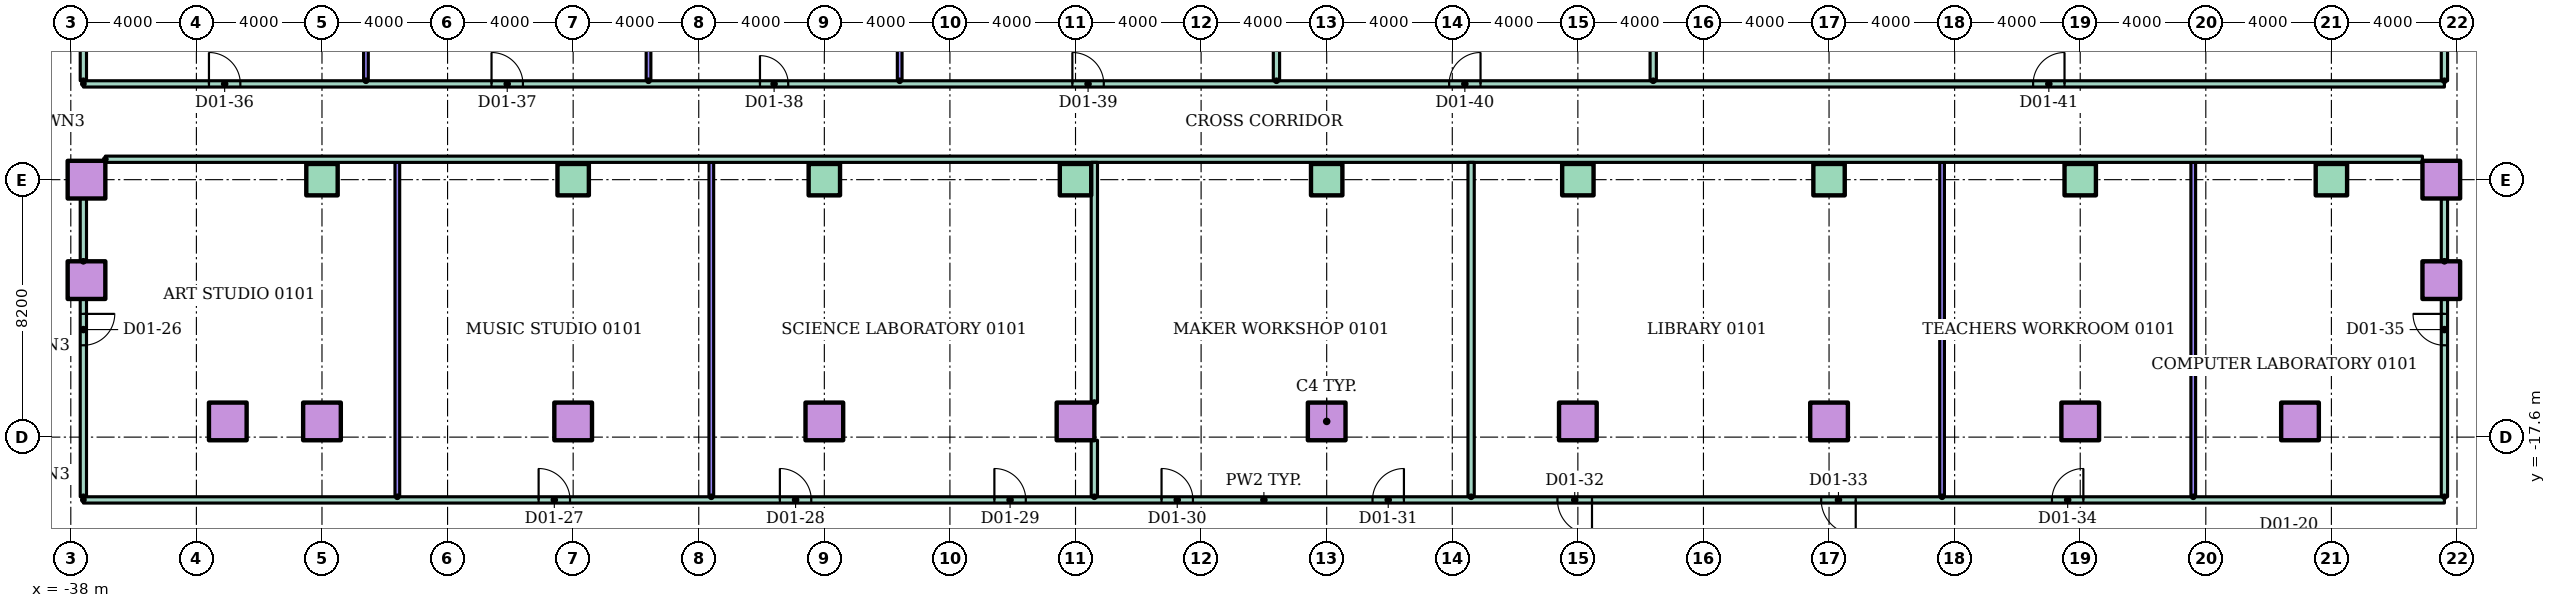
"""IFC4 building model, lengths in metres.
Left out: names, types, materials, properties, quantities, classifications, styles, units other than length and angle.
Written with IfcOpenShell. Run it as: python <this file> out.ifc"""

import sys

from ifc_helpers import new_model, si_unit, direction, frame, frame_2d, origin, origin_2d, place, context, subcontext, project, spatial, rectangle, hollow_rectangle, extrude, element, fill, save


model = new_model("IFC4")
c1 = context("Model", 3, precision=1e-05, world=origin(), true_north=direction((0.0, 1.0)))
c2 = subcontext(c1, "Body", "Model", "MODEL_VIEW")
j1 = project(units=[si_unit("LENGTHUNIT", "METRE"), si_unit("PLANEANGLEUNIT", "RADIAN")], contexts=[c1])
p1 = place(None, origin())
s1 = spatial("IfcSite", under=j1, at=p1, CompositionType="ELEMENT")
p2 = place(p1, origin())
s2 = spatial("IfcBuilding", under=s1, at=p2, CompositionType="ELEMENT")
p3 = place(p2, frame((0.0, 0.0, 6.0)))
s3 = spatial("IfcBuildingStorey", under=s2, at=p3, CompositionType="ELEMENT", Elevation=6.0)
for number, where in (
    (1, (-33.0, -17.1, 0.0)),
    (2, (-30.0, -17.1, 0.0)),
    (3, (-22.0, -17.1, 0.0)),
    (4, (-14.0, -17.1, 0.0)),
    (5, (-6.0, -17.1, 0.0)),
    (6, (2.0, -17.1, 0.0)),
    (7, (10.0, -17.1, 0.0)),
    (8, (18.0, -17.1, 0.0)),
    (9, (26.0, -17.1, 0.0)),
    (10, (33.0, -17.1, 0.0)),
    (11, (-37.5, -12.6, 0.0)),
    (12, (37.5, -12.6, 0.0)),
    (13, (-37.5, -9.4, 0.0)),
):
    element("IfcColumn", number, at=place(p3, frame(where)), inside=s3, PredefinedType="COLUMN", context=c2, shape_type="SweptSolid", body=[
        extrude(hollow_rectangle(XDim=1.2, YDim=1.2, WallThickness=0.06, at=origin_2d()), origin(), (0.0, 0.0, 1.0), 4.0),
    ])
for number, where in (
    (14, (-30.0, -9.4, 0.0)),
    (15, (-22.0, -9.4, 0.0)),
    (16, (-14.0, -9.4, 0.0)),
    (17, (-6.0, -9.4, 0.0)),
    (18, (2.0, -9.4, 0.0)),
    (19, (10.0, -9.4, 0.0)),
    (20, (18.0, -9.4, 0.0)),
    (21, (26.0, -9.4, 0.0)),
    (22, (34.0, -9.4, 0.0)),
):
    element("IfcColumn", number, at=place(p3, frame(where)), inside=s3, PredefinedType="COLUMN", context=c2, shape_type="SweptSolid", body=[
        extrude(rectangle(XDim=1.0, YDim=1.0, at=origin_2d()), origin(), (0.0, 0.0, 1.0), 4.0),
    ])
p4 = place(p3, frame((37.5, -9.4, 0.0)))
e23 = element("IfcColumn", 23, at=p4, inside=s3, PredefinedType="COLUMN", context=c2, shape_type="SweptSolid", body=[
    extrude(hollow_rectangle(XDim=1.2, YDim=1.2, WallThickness=0.06, at=origin_2d()), origin(), (0.0, 0.0, 1.0), 4.0),
])
p5 = place(p3, frame((-37.6, -19.6, 0.0)))
e24 = element("IfcWall", 24, at=p5, inside=s3, PredefinedType="PARTITIONING", context=c2, shape_type="SweptSolid", body=[
    extrude(rectangle(XDim=75.2, YDim=0.2, at=frame_2d((37.6, 0.0))), origin(), (0.0, 0.0, 1.0), 3.7),
])
p6 = place(p5, frame((14.5, 0.0, 0.0)))
e25 = element("IfcOpeningElement", 25, at=p6, cuts=e24, PredefinedType="OPENING", context=c2, shape_type="SweptSolid", body=[
    extrude(rectangle(XDim=1.0, YDim=2.1, at=frame_2d((0.5, 1.05))), frame((0.0, 0.11, 0.0), z_axis=(0.0, -1.0, 0.0), x_axis=(1.0, 0.0, 0.0)), (0.0, 0.0, 1.0), 0.22),
])
p7 = place(p5, frame((22.184, 0.0, 0.0)))
e26 = element("IfcOpeningElement", 26, at=p7, cuts=e24, PredefinedType="OPENING", context=c2, shape_type="SweptSolid", body=[
    extrude(rectangle(XDim=1.0, YDim=2.1, at=frame_2d((0.5, 1.05))), frame((0.0, 0.11, 0.0), z_axis=(0.0, -1.0, 0.0), x_axis=(1.0, 0.0, 0.0)), (0.0, 0.0, 1.0), 0.22),
])
p8 = place(p5, frame((29.016, 0.0, 0.0)))
e27 = element("IfcOpeningElement", 27, at=p8, cuts=e24, PredefinedType="OPENING", context=c2, shape_type="SweptSolid", body=[
    extrude(rectangle(XDim=1.0, YDim=2.1, at=frame_2d((0.5, 1.05))), frame((0.0, 0.11, 0.0), z_axis=(0.0, -1.0, 0.0), x_axis=(1.0, 0.0, 0.0)), (0.0, 0.0, 1.0), 0.22),
])
p9 = place(p5, frame((34.34, 0.0, 0.0)))
e28 = element("IfcOpeningElement", 28, at=p9, cuts=e24, PredefinedType="OPENING", context=c2, shape_type="SweptSolid", body=[
    extrude(rectangle(XDim=1.0, YDim=2.1, at=frame_2d((0.5, 1.05))), frame((0.0, 0.11, 0.0), z_axis=(0.0, -1.0, 0.0), x_axis=(1.0, 0.0, 0.0)), (0.0, 0.0, 1.0), 0.22),
])
p10 = place(p5, frame((41.06, 0.0, 0.0)))
e29 = element("IfcOpeningElement", 29, at=p10, cuts=e24, PredefinedType="OPENING", context=c2, shape_type="SweptSolid", body=[
    extrude(rectangle(XDim=1.0, YDim=2.1, at=frame_2d((0.5, 1.05))), frame((0.0, 0.11, 0.0), z_axis=(0.0, -1.0, 0.0), x_axis=(1.0, 0.0, 0.0)), (0.0, 0.0, 1.0), 0.22),
])
p11 = place(p5, frame((46.95, 0.0, 0.0)))
e30 = element("IfcOpeningElement", 30, at=p11, cuts=e24, PredefinedType="OPENING", context=c2, shape_type="SweptSolid", body=[
    extrude(rectangle(XDim=1.1, YDim=2.1, at=frame_2d((0.55, 1.05))), frame((0.0, 0.11, 0.0), z_axis=(0.0, -1.0, 0.0), x_axis=(1.0, 0.0, 0.0)), (0.0, 0.0, 1.0), 0.22),
])
p12 = place(p5, frame((55.35, 0.0, 0.0)))
e31 = element("IfcOpeningElement", 31, at=p12, cuts=e24, PredefinedType="OPENING", context=c2, shape_type="SweptSolid", body=[
    extrude(rectangle(XDim=1.1, YDim=2.1, at=frame_2d((0.55, 1.05))), frame((0.0, 0.11, 0.0), z_axis=(0.0, -1.0, 0.0), x_axis=(1.0, 0.0, 0.0)), (0.0, 0.0, 1.0), 0.22),
])
p13 = place(p5, frame((62.7, 0.0, 0.0)))
e32 = element("IfcOpeningElement", 32, at=p13, cuts=e24, PredefinedType="OPENING", context=c2, shape_type="SweptSolid", body=[
    extrude(rectangle(XDim=1.0, YDim=2.1, at=frame_2d((0.5, 1.05))), frame((0.0, 0.11, 0.0), z_axis=(0.0, -1.0, 0.0), x_axis=(1.0, 0.0, 0.0)), (0.0, 0.0, 1.0), 0.22),
])
p14 = place(p3, frame((-36.9, -8.75, 0.0)))
e33 = element("IfcWall", 33, at=p14, inside=s3, PredefinedType="PARTITIONING", context=c2, shape_type="SweptSolid", body=[
    extrude(rectangle(XDim=73.8, YDim=0.2, at=frame_2d((36.9, 0.0))), origin(), (0.0, 0.0, 1.0), 3.7),
])
p15 = place(p3, frame((-37.6, -6.35, 0.0)))
e34 = element("IfcWall", 34, at=p15, inside=s3, PredefinedType="PARTITIONING", context=c2, shape_type="SweptSolid", body=[
    extrude(rectangle(XDim=75.2, YDim=0.2, at=frame_2d((37.6, 0.0))), origin(), (0.0, 0.0, 1.0), 3.7),
])
p16 = place(p15, frame((4.0, 0.0, 0.0)))
e35 = element("IfcOpeningElement", 35, at=p16, cuts=e34, PredefinedType="OPENING", context=c2, shape_type="SweptSolid", body=[
    extrude(rectangle(XDim=1.0, YDim=2.1, at=frame_2d((0.5, 1.05))), frame((0.0, 0.11, 0.0), z_axis=(0.0, -1.0, 0.0), x_axis=(1.0, 0.0, 0.0)), (0.0, 0.0, 1.0), 0.22),
])
p17 = place(p15, frame((13.0, 0.0, 0.0)))
e36 = element("IfcOpeningElement", 36, at=p17, cuts=e34, PredefinedType="OPENING", context=c2, shape_type="SweptSolid", body=[
    extrude(rectangle(XDim=1.0, YDim=2.1, at=frame_2d((0.5, 1.05))), frame((0.0, 0.11, 0.0), z_axis=(0.0, -1.0, 0.0), x_axis=(1.0, 0.0, 0.0)), (0.0, 0.0, 1.0), 0.22),
])
p18 = place(p15, frame((21.55, 0.0, 0.0)))
e37 = element("IfcOpeningElement", 37, at=p18, cuts=e34, PredefinedType="OPENING", context=c2, shape_type="SweptSolid", body=[
    extrude(rectangle(XDim=0.9, YDim=2.1, at=frame_2d((0.45, 1.05))), frame((0.0, 0.11, 0.0), z_axis=(0.0, -1.0, 0.0), x_axis=(1.0, 0.0, 0.0)), (0.0, 0.0, 1.0), 0.22),
])
p19 = place(p15, frame((31.5, 0.0, 0.0)))
e38 = element("IfcOpeningElement", 38, at=p19, cuts=e34, PredefinedType="OPENING", context=c2, shape_type="SweptSolid", body=[
    extrude(rectangle(XDim=1.0, YDim=2.1, at=frame_2d((0.5, 1.05))), frame((0.0, 0.11, 0.0), z_axis=(0.0, -1.0, 0.0), x_axis=(1.0, 0.0, 0.0)), (0.0, 0.0, 1.0), 0.22),
])
p20 = place(p15, frame((43.5, 0.0, 0.0)))
e39 = element("IfcOpeningElement", 39, at=p20, cuts=e34, PredefinedType="OPENING", context=c2, shape_type="SweptSolid", body=[
    extrude(rectangle(XDim=1.0, YDim=2.1, at=frame_2d((0.5, 1.05))), frame((0.0, 0.11, 0.0), z_axis=(0.0, -1.0, 0.0), x_axis=(1.0, 0.0, 0.0)), (0.0, 0.0, 1.0), 0.22),
])
p21 = place(p15, frame((62.1, 0.0, 0.0)))
e40 = element("IfcOpeningElement", 40, at=p21, cuts=e34, PredefinedType="OPENING", context=c2, shape_type="SweptSolid", body=[
    extrude(rectangle(XDim=1.0, YDim=2.1, at=frame_2d((0.5, 1.05))), frame((0.0, 0.11, 0.0), z_axis=(0.0, -1.0, 0.0), x_axis=(1.0, 0.0, 0.0)), (0.0, 0.0, 1.0), 0.22),
])
p22 = place(p3, frame((-37.6, -19.5, 0.0), z_axis=(0.0, 0.0, 1.0), x_axis=(0.0, 1.0, 0.0)))
e41 = element("IfcWall", 41, at=p22, inside=s3, PredefinedType="PARTITIONING", context=c2, shape_type="SweptSolid", body=[
    extrude(rectangle(XDim=6.3, YDim=0.2, at=frame_2d((3.15, 0.0))), origin(), (0.0, 0.0, 1.0), 3.7),
])
p23 = place(p22, frame((4.825, 0.0, 0.0)))
e42 = element("IfcOpeningElement", 42, at=p23, cuts=e41, PredefinedType="OPENING", context=c2, shape_type="SweptSolid", body=[
    extrude(rectangle(XDim=1.0, YDim=2.1, at=frame_2d((0.5, 1.05))), frame((0.0, 0.11, 0.0), z_axis=(0.0, -1.0, 0.0), x_axis=(1.0, 0.0, 0.0)), (0.0, 0.0, 1.0), 0.22),
])
p24 = place(p3, frame((-37.6, -12.0, 0.0), z_axis=(0.0, 0.0, 1.0), x_axis=(0.0, 1.0, 0.0)))
e43 = element("IfcWall", 43, at=p24, inside=s3, PredefinedType="PARTITIONING", context=c2, shape_type="SweptSolid", body=[
    extrude(rectangle(XDim=2.0, YDim=0.2, at=frame_2d((1.0, 0.0))), origin(), (0.0, 0.0, 1.0), 3.7),
])
p25 = place(p3, frame((-37.6, -6.25, 0.0), z_axis=(0.0, 0.0, 1.0), x_axis=(0.0, 1.0, 0.0)))
e44 = element("IfcWall", 44, at=p25, inside=s3, PredefinedType="PARTITIONING", context=c2, shape_type="SweptSolid", body=[
    extrude(rectangle(XDim=3.65, YDim=0.2, at=frame_2d((1.825, 0.0))), origin(), (0.0, 0.0, 1.0), 3.7),
])
p26 = place(p3, frame((-28.6, -6.25, 0.0), z_axis=(0.0, 0.0, 1.0), x_axis=(0.0, 1.0, 0.0)))
e45 = element("IfcWall", 45, at=p26, inside=s3, PredefinedType="PARTITIONING", context=c2, shape_type="SweptSolid", body=[
    extrude(rectangle(XDim=4.75, YDim=0.15, at=frame_2d((2.375, 0.0))), origin(), (0.0, 0.0, 1.0), 3.7),
])
p27 = place(p3, frame((-27.6, -19.5, 0.0), z_axis=(0.0, 0.0, 1.0), x_axis=(0.0, 1.0, 0.0)))
e46 = element("IfcWall", 46, at=p27, inside=s3, PredefinedType="PARTITIONING", context=c2, shape_type="SweptSolid", body=[
    extrude(rectangle(XDim=10.65, YDim=0.15, at=frame_2d((5.325, 0.0))), origin(), (0.0, 0.0, 1.0), 3.7),
])
p28 = place(p3, frame((-19.6, -6.25, 0.0), z_axis=(0.0, 0.0, 1.0), x_axis=(0.0, 1.0, 0.0)))
e47 = element("IfcWall", 47, at=p28, inside=s3, PredefinedType="PARTITIONING", context=c2, shape_type="SweptSolid", body=[
    extrude(rectangle(XDim=4.75, YDim=0.15, at=frame_2d((2.375, 0.0))), origin(), (0.0, 0.0, 1.0), 3.7),
])
p29 = place(p3, frame((-17.6, -19.5, 0.0), z_axis=(0.0, 0.0, 1.0), x_axis=(0.0, 1.0, 0.0)))
e48 = element("IfcWall", 48, at=p29, inside=s3, PredefinedType="PARTITIONING", context=c2, shape_type="SweptSolid", body=[
    extrude(rectangle(XDim=10.65, YDim=0.15, at=frame_2d((5.325, 0.0))), origin(), (0.0, 0.0, 1.0), 3.7),
])
p30 = place(p3, frame((-11.6, -6.25, 0.0), z_axis=(0.0, 0.0, 1.0), x_axis=(0.0, 1.0, 0.0)))
e49 = element("IfcWall", 49, at=p30, inside=s3, PredefinedType="PARTITIONING", context=c2, shape_type="SweptSolid", body=[
    extrude(rectangle(XDim=4.85, YDim=0.15, at=frame_2d((2.425, 0.0))), origin(), (0.0, 0.0, 1.0), 3.7),
])
p31 = place(p3, frame((-5.4, -19.5, 0.0), z_axis=(0.0, 0.0, 1.0), x_axis=(0.0, 1.0, 0.0)))
e50 = element("IfcWall", 50, at=p31, inside=s3, PredefinedType="PARTITIONING", context=c2, shape_type="SweptSolid", body=[
    extrude(rectangle(XDim=1.8, YDim=0.2, at=frame_2d((0.9, 0.0))), origin(), (0.0, 0.0, 1.0), 3.7),
])
p32 = place(p3, frame((-5.4, -16.5, 0.0), z_axis=(0.0, 0.0, 1.0), x_axis=(0.0, 1.0, 0.0)))
e51 = element("IfcWall", 51, at=p32, inside=s3, PredefinedType="PARTITIONING", context=c2, shape_type="SweptSolid", body=[
    extrude(rectangle(XDim=7.65, YDim=0.2, at=frame_2d((3.825, 0.0))), origin(), (0.0, 0.0, 1.0), 3.7),
])
p33 = place(p3, frame((0.4, -6.25, 0.0), z_axis=(0.0, 0.0, 1.0), x_axis=(0.0, 1.0, 0.0)))
e52 = element("IfcWall", 52, at=p33, inside=s3, PredefinedType="PARTITIONING", context=c2, shape_type="SweptSolid", body=[
    extrude(rectangle(XDim=4.85, YDim=0.2, at=frame_2d((2.425, 0.0))), origin(), (0.0, 0.0, 1.0), 3.7),
])
p34 = place(p3, frame((6.6, -19.5, 0.0), z_axis=(0.0, 0.0, 1.0), x_axis=(0.0, 1.0, 0.0)))
e53 = element("IfcWall", 53, at=p34, inside=s3, PredefinedType="PARTITIONING", context=c2, shape_type="SweptSolid", body=[
    extrude(rectangle(XDim=10.65, YDim=0.2, at=frame_2d((5.325, 0.0))), origin(), (0.0, 0.0, 1.0), 3.7),
])
p35 = place(p3, frame((12.4, -6.25, 0.0), z_axis=(0.0, 0.0, 1.0), x_axis=(0.0, 1.0, 0.0)))
e54 = element("IfcWall", 54, at=p35, inside=s3, PredefinedType="PARTITIONING", context=c2, shape_type="SweptSolid", body=[
    extrude(rectangle(XDim=4.85, YDim=0.2, at=frame_2d((2.425, 0.0))), origin(), (0.0, 0.0, 1.0), 3.7),
])
for number, where, z_axis, x_axis in (
    (55, (21.6, -19.5, 0.0), (0.0, 0.0, 1.0), (0.0, 1.0, 0.0)),
    (56, (29.6, -19.5, 0.0), (0.0, 0.0, 1.0), (0.0, 1.0, 0.0)),
):
    element("IfcWall", number, at=place(p3, frame(where, z_axis=z_axis, x_axis=x_axis)), inside=s3, PredefinedType="PARTITIONING", context=c2, shape_type="SweptSolid", body=[
        extrude(rectangle(XDim=10.65, YDim=0.15, at=frame_2d((5.325, 0.0))), origin(), (0.0, 0.0, 1.0), 3.7),
    ])
p36 = place(p3, frame((37.6, -19.5, 0.0), z_axis=(0.0, 0.0, 1.0), x_axis=(0.0, 1.0, 0.0)))
e57 = element("IfcWall", 57, at=p36, inside=s3, PredefinedType="PARTITIONING", context=c2, shape_type="SweptSolid", body=[
    extrude(rectangle(XDim=6.3, YDim=0.2, at=frame_2d((3.15, 0.0))), origin(), (0.0, 0.0, 1.0), 3.7),
])
p37 = place(p36, frame((4.825, 0.0, 0.0)))
e58 = element("IfcOpeningElement", 58, at=p37, cuts=e57, PredefinedType="OPENING", context=c2, shape_type="SweptSolid", body=[
    extrude(rectangle(XDim=1.0, YDim=2.1, at=frame_2d((0.5, 1.05))), frame((0.0, 0.11, 0.0), z_axis=(0.0, -1.0, 0.0), x_axis=(1.0, 0.0, 0.0)), (0.0, 0.0, 1.0), 0.22),
])
p38 = place(p3, frame((37.6, -12.0, 0.0), z_axis=(0.0, 0.0, 1.0), x_axis=(0.0, 1.0, 0.0)))
e59 = element("IfcWall", 59, at=p38, inside=s3, PredefinedType="PARTITIONING", context=c2, shape_type="SweptSolid", body=[
    extrude(rectangle(XDim=2.0, YDim=0.2, at=frame_2d((1.0, 0.0))), origin(), (0.0, 0.0, 1.0), 3.7),
])
p39 = place(p3, frame((37.6, -6.25, 0.0), z_axis=(0.0, 0.0, 1.0), x_axis=(0.0, 1.0, 0.0)))
e60 = element("IfcWall", 60, at=p39, inside=s3, PredefinedType="PARTITIONING", context=c2, shape_type="SweptSolid", body=[
    extrude(rectangle(XDim=3.65, YDim=0.2, at=frame_2d((1.825, 0.0))), origin(), (0.0, 0.0, 1.0), 3.7),
])
p40 = place(p23, frame((1.0, 0.0, 0.0), z_axis=(0.0, 0.0, 1.0), x_axis=(-1.0, 0.0, 0.0)))
e61 = element("IfcDoor", 61, at=p40, inside=s3, OperationType="SINGLE_SWING_RIGHT", PredefinedType="DOOR", context=c2, shape_type="SweptSolid", body=[
    extrude(rectangle(XDim=1.0, YDim=2.1, at=frame_2d((0.5, 1.05))), frame((0.0, 0.025, 0.0), z_axis=(0.0, -1.0, 0.0), x_axis=(1.0, 0.0, 0.0)), (0.0, 0.0, 1.0), 0.05),
])
fill(e42, e61)
p41 = place(p6, origin())
e62 = element("IfcDoor", 62, at=p41, inside=s3, OperationType="SINGLE_SWING_LEFT", PredefinedType="DOOR", context=c2, shape_type="SweptSolid", body=[
    extrude(rectangle(XDim=1.0, YDim=2.1, at=frame_2d((0.5, 1.05))), frame((0.0, 0.025, 0.0), z_axis=(0.0, -1.0, 0.0), x_axis=(1.0, 0.0, 0.0)), (0.0, 0.0, 1.0), 0.05),
])
fill(e25, e62)
p42 = place(p7, origin())
e63 = element("IfcDoor", 63, at=p42, inside=s3, OperationType="SINGLE_SWING_LEFT", PredefinedType="DOOR", context=c2, shape_type="SweptSolid", body=[
    extrude(rectangle(XDim=1.0, YDim=2.1, at=frame_2d((0.5, 1.05))), frame((0.0, 0.025, 0.0), z_axis=(0.0, -1.0, 0.0), x_axis=(1.0, 0.0, 0.0)), (0.0, 0.0, 1.0), 0.05),
])
fill(e26, e63)
p43 = place(p8, origin())
e64 = element("IfcDoor", 64, at=p43, inside=s3, OperationType="SINGLE_SWING_LEFT", PredefinedType="DOOR", context=c2, shape_type="SweptSolid", body=[
    extrude(rectangle(XDim=1.0, YDim=2.1, at=frame_2d((0.5, 1.05))), frame((0.0, 0.025, 0.0), z_axis=(0.0, -1.0, 0.0), x_axis=(1.0, 0.0, 0.0)), (0.0, 0.0, 1.0), 0.05),
])
fill(e27, e64)
p44 = place(p9, origin())
e65 = element("IfcDoor", 65, at=p44, inside=s3, OperationType="SINGLE_SWING_LEFT", PredefinedType="DOOR", context=c2, shape_type="SweptSolid", body=[
    extrude(rectangle(XDim=1.0, YDim=2.1, at=frame_2d((0.5, 1.05))), frame((0.0, 0.025, 0.0), z_axis=(0.0, -1.0, 0.0), x_axis=(1.0, 0.0, 0.0)), (0.0, 0.0, 1.0), 0.05),
])
fill(e28, e65)
p45 = place(p10, origin())
e66 = element("IfcDoor", 66, at=p45, inside=s3, OperationType="SINGLE_SWING_RIGHT", PredefinedType="DOOR", context=c2, shape_type="SweptSolid", body=[
    extrude(rectangle(XDim=1.0, YDim=2.1, at=frame_2d((0.5, 1.05))), frame((0.0, 0.025, 0.0), z_axis=(0.0, -1.0, 0.0), x_axis=(1.0, 0.0, 0.0)), (0.0, 0.0, 1.0), 0.05),
])
fill(e29, e66)
p46 = place(p11, frame((1.1, 0.0, 0.0), z_axis=(0.0, 0.0, 1.0), x_axis=(-1.0, 0.0, 0.0)))
e67 = element("IfcDoor", 67, at=p46, inside=s3, OperationType="SINGLE_SWING_RIGHT", PredefinedType="DOOR", context=c2, shape_type="SweptSolid", body=[
    extrude(rectangle(XDim=1.1, YDim=2.1, at=frame_2d((0.55, 1.05))), frame((0.0, 0.025, 0.0), z_axis=(0.0, -1.0, 0.0), x_axis=(1.0, 0.0, 0.0)), (0.0, 0.0, 1.0), 0.05),
])
fill(e30, e67)
p47 = place(p12, frame((1.1, 0.0, 0.0), z_axis=(0.0, 0.0, 1.0), x_axis=(-1.0, 0.0, 0.0)))
e68 = element("IfcDoor", 68, at=p47, inside=s3, OperationType="SINGLE_SWING_RIGHT", PredefinedType="DOOR", context=c2, shape_type="SweptSolid", body=[
    extrude(rectangle(XDim=1.1, YDim=2.1, at=frame_2d((0.55, 1.05))), frame((0.0, 0.025, 0.0), z_axis=(0.0, -1.0, 0.0), x_axis=(1.0, 0.0, 0.0)), (0.0, 0.0, 1.0), 0.05),
])
fill(e31, e68)
p48 = place(p13, origin())
e69 = element("IfcDoor", 69, at=p48, inside=s3, OperationType="SINGLE_SWING_RIGHT", PredefinedType="DOOR", context=c2, shape_type="SweptSolid", body=[
    extrude(rectangle(XDim=1.0, YDim=2.1, at=frame_2d((0.5, 1.05))), frame((0.0, 0.025, 0.0), z_axis=(0.0, -1.0, 0.0), x_axis=(1.0, 0.0, 0.0)), (0.0, 0.0, 1.0), 0.05),
])
fill(e32, e69)
p49 = place(p37, origin())
e70 = element("IfcDoor", 70, at=p49, inside=s3, OperationType="SINGLE_SWING_RIGHT", PredefinedType="DOOR", context=c2, shape_type="SweptSolid", body=[
    extrude(rectangle(XDim=1.0, YDim=2.1, at=frame_2d((0.5, 1.05))), frame((0.0, 0.025, 0.0), z_axis=(0.0, -1.0, 0.0), x_axis=(1.0, 0.0, 0.0)), (0.0, 0.0, 1.0), 0.05),
])
fill(e58, e70)
p50 = place(p16, origin())
e71 = element("IfcDoor", 71, at=p50, inside=s3, OperationType="SINGLE_SWING_LEFT", PredefinedType="DOOR", context=c2, shape_type="SweptSolid", body=[
    extrude(rectangle(XDim=1.0, YDim=2.1, at=frame_2d((0.5, 1.05))), frame((0.0, 0.025, 0.0), z_axis=(0.0, -1.0, 0.0), x_axis=(1.0, 0.0, 0.0)), (0.0, 0.0, 1.0), 0.05),
])
fill(e35, e71)
p51 = place(p17, origin())
e72 = element("IfcDoor", 72, at=p51, inside=s3, OperationType="SINGLE_SWING_LEFT", PredefinedType="DOOR", context=c2, shape_type="SweptSolid", body=[
    extrude(rectangle(XDim=1.0, YDim=2.1, at=frame_2d((0.5, 1.05))), frame((0.0, 0.025, 0.0), z_axis=(0.0, -1.0, 0.0), x_axis=(1.0, 0.0, 0.0)), (0.0, 0.0, 1.0), 0.05),
])
fill(e36, e72)
p52 = place(p18, origin())
e73 = element("IfcDoor", 73, at=p52, inside=s3, OperationType="SINGLE_SWING_LEFT", PredefinedType="DOOR", context=c2, shape_type="SweptSolid", body=[
    extrude(rectangle(XDim=0.9, YDim=2.1, at=frame_2d((0.45, 1.05))), frame((0.0, 0.025, 0.0), z_axis=(0.0, -1.0, 0.0), x_axis=(1.0, 0.0, 0.0)), (0.0, 0.0, 1.0), 0.05),
])
fill(e37, e73)
p53 = place(p19, origin())
e74 = element("IfcDoor", 74, at=p53, inside=s3, OperationType="SINGLE_SWING_LEFT", PredefinedType="DOOR", context=c2, shape_type="SweptSolid", body=[
    extrude(rectangle(XDim=1.0, YDim=2.1, at=frame_2d((0.5, 1.05))), frame((0.0, 0.025, 0.0), z_axis=(0.0, -1.0, 0.0), x_axis=(1.0, 0.0, 0.0)), (0.0, 0.0, 1.0), 0.05),
])
fill(e38, e74)
p54 = place(p20, origin())
e75 = element("IfcDoor", 75, at=p54, inside=s3, OperationType="SINGLE_SWING_RIGHT", PredefinedType="DOOR", context=c2, shape_type="SweptSolid", body=[
    extrude(rectangle(XDim=1.0, YDim=2.1, at=frame_2d((0.5, 1.05))), frame((0.0, 0.025, 0.0), z_axis=(0.0, -1.0, 0.0), x_axis=(1.0, 0.0, 0.0)), (0.0, 0.0, 1.0), 0.05),
])
fill(e39, e75)
p55 = place(p21, origin())
e76 = element("IfcDoor", 76, at=p55, inside=s3, OperationType="SINGLE_SWING_RIGHT", PredefinedType="DOOR", context=c2, shape_type="SweptSolid", body=[
    extrude(rectangle(XDim=1.0, YDim=2.1, at=frame_2d((0.5, 1.05))), frame((0.0, 0.025, 0.0), z_axis=(0.0, -1.0, 0.0), x_axis=(1.0, 0.0, 0.0)), (0.0, 0.0, 1.0), 0.05),
])
fill(e40, e76)
save(model, sys.argv[1])
